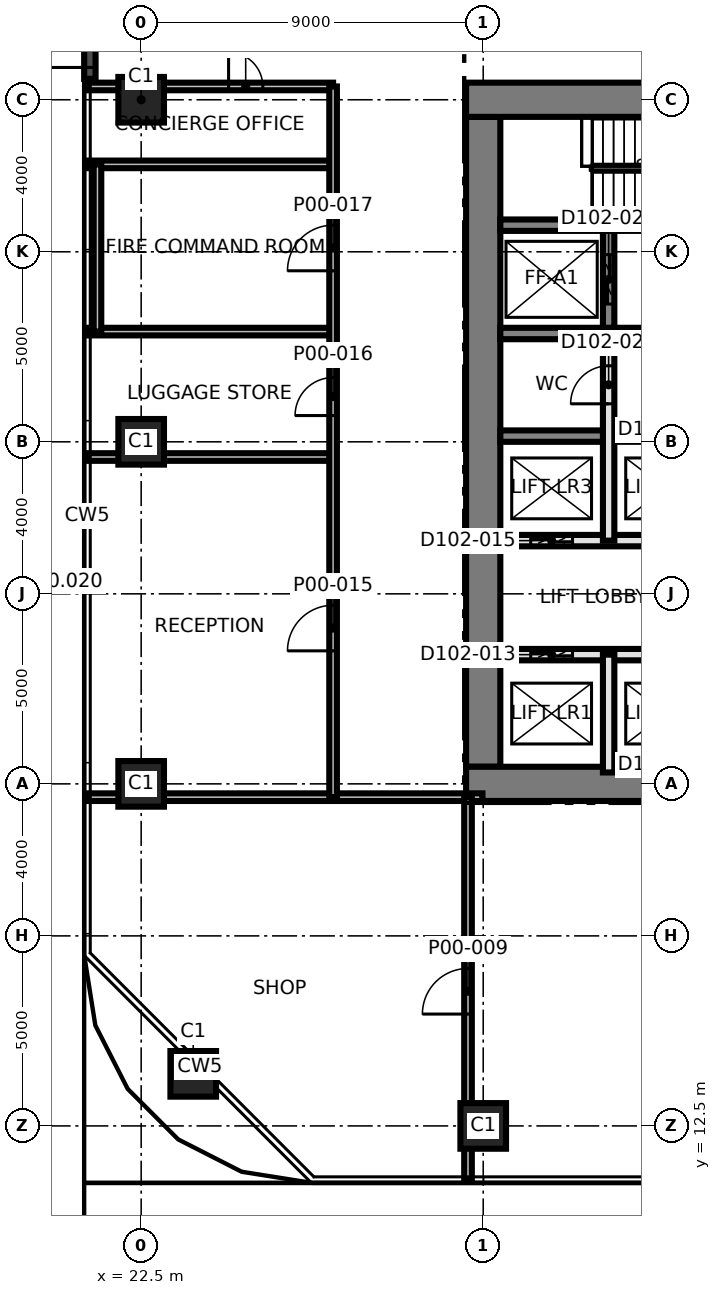
"""IFC4 building model, lengths in metres.
Left out: names, types, materials, properties, quantities, classifications, styles, units other than length and angle.
Written with IfcOpenShell. Run it as: python <this file> out.ifc"""

import sys

from ifc_helpers import new_model, si_unit, direction, frame, frame_2d, origin, origin_2d, place, context, subcontext, project, spatial, rectangle, extrude, element, fill, save


model = new_model("IFC4")
c1 = context("Model", 3, precision=1e-05, world=origin(), true_north=direction((0.0, 1.0)))
c2 = subcontext(c1, "Body", "Model", "MODEL_VIEW")
j1 = project(units=[si_unit("LENGTHUNIT", "METRE"), si_unit("PLANEANGLEUNIT", "RADIAN")], contexts=[c1])
p1 = place(None, origin())
s1 = spatial("IfcSite", under=j1, at=p1, CompositionType="ELEMENT")
p2 = place(p1, origin())
s2 = spatial("IfcBuilding", under=s1, at=p2, CompositionType="ELEMENT")
p3 = place(p2, origin())
s3 = spatial("IfcBuildingStorey", under=s2, at=p3, CompositionType="ELEMENT", Elevation=0.0)
p4 = place(p3, frame((31.5, 21.95, 0.0), z_axis=(0.0, 0.0, 1.0), x_axis=(0.0, 1.0, 0.0)))
e1 = element("IfcWall", 1, at=p4, inside=s3, PredefinedType="SHEAR", context=c2, shape_type="SweptSolid", body=[
    extrude(rectangle(XDim=17.1, YDim=0.9, at=frame_2d((8.55, 0.0))), origin(), (0.0, 0.0, 1.0), 8.0),
])
p5 = place(p3, frame((31.05, 21.5, 0.0), z_axis=(0.0, 0.0, 1.0), x_axis=(1.0, 0.0, 0.0)))
e2 = element("IfcWall", 2, at=p5, inside=s3, PredefinedType="SHEAR", context=c2, shape_type="SweptSolid", body=[
    extrude(rectangle(XDim=27.0, YDim=0.9, at=frame_2d((13.5, 0.0))), origin(), (0.0, 0.0, 1.0), 8.0),
])
p6 = place(p3, frame((31.05, 39.5, 0.0), z_axis=(0.0, 0.0, 1.0), x_axis=(1.0, 0.0, 0.0)))
e3 = element("IfcWall", 3, at=p6, inside=s3, PredefinedType="SHEAR", context=c2, shape_type="SweptSolid", body=[
    extrude(rectangle(XDim=27.0, YDim=0.9, at=frame_2d((13.5, 0.0))), origin(), (0.0, 0.0, 1.0), 8.0),
])
p7 = place(p6, frame((7.1, 0.0, 0.0)))
e4 = element("IfcOpeningElement", 4, at=p7, cuts=e3, PredefinedType="OPENING", context=c2, shape_type="SweptSolid", body=[
    extrude(rectangle(XDim=1.3, YDim=2.1, at=frame_2d((0.65, 1.05))), frame((0.0, 0.46, 0.0), z_axis=(0.0, -1.0, 0.0), x_axis=(1.0, 0.0, 0.0)), (0.0, 0.0, 1.0), 0.92),
])
p8 = place(p6, frame((18.475, 0.0, 0.0)))
e5 = element("IfcOpeningElement", 5, at=p8, cuts=e3, PredefinedType="OPENING", context=c2, shape_type="SweptSolid", body=[
    extrude(rectangle(XDim=0.95, YDim=2.1, at=frame_2d((0.475, 1.05))), frame((0.0, 0.46, 0.0), z_axis=(0.0, -1.0, 0.0), x_axis=(1.0, 0.0, 0.0)), (0.0, 0.0, 1.0), 0.92),
])
p9 = place(p3, frame((31.95, 30.65, 0.0), z_axis=(0.0, 0.0, 1.0), x_axis=(1.0, 0.0, 0.0)))
e6 = element("IfcWall", 6, at=p9, inside=s3, PredefinedType="SHEAR", context=c2, shape_type="SweptSolid", body=[
    extrude(rectangle(XDim=26.1, YDim=0.3, at=frame_2d((13.05, 0.0))), origin(), (0.0, 0.0, 1.0), 8.0),
])
p10 = place(p9, frame((24.55, 0.0, 0.0)))
e7 = element("IfcOpeningElement", 7, at=p10, cuts=e6, PredefinedType="OPENING", context=c2, shape_type="SweptSolid", body=[
    extrude(rectangle(XDim=1.0, YDim=2.1, at=frame_2d((0.5, 1.05))), frame((0.0, 0.16, 0.0), z_axis=(0.0, -1.0, 0.0), x_axis=(1.0, 0.0, 0.0)), (0.0, 0.0, 1.0), 0.32),
])
p11 = place(p9, frame((11.35, 0.0, 0.0)))
e8 = element("IfcOpeningElement", 8, at=p11, cuts=e6, PredefinedType="OPENING", context=c2, shape_type="SweptSolid", body=[
    extrude(rectangle(XDim=1.0, YDim=2.1, at=frame_2d((0.5, 1.05))), frame((0.0, 0.16, 0.0), z_axis=(0.0, -1.0, 0.0), x_axis=(1.0, 0.0, 0.0)), (0.0, 0.0, 1.0), 0.32),
])
p12 = place(p3, frame((31.95, 33.35, 0.0), z_axis=(0.0, 0.0, 1.0), x_axis=(1.0, 0.0, 0.0)))
e9 = element("IfcWall", 9, at=p12, inside=s3, PredefinedType="SHEAR", context=c2, shape_type="SweptSolid", body=[
    extrude(rectangle(XDim=26.1, YDim=0.3, at=frame_2d((13.05, 0.0))), origin(), (0.0, 0.0, 1.0), 8.0),
])
p13 = place(p12, frame((13.7, 0.0, 0.0)))
e10 = element("IfcOpeningElement", 10, at=p13, cuts=e9, PredefinedType="OPENING", context=c2, shape_type="SweptSolid", body=[
    extrude(rectangle(XDim=1.4, YDim=2.1, at=frame_2d((0.7, 1.05))), frame((0.0, 0.16, 0.0), z_axis=(0.0, -1.0, 0.0), x_axis=(1.0, 0.0, 0.0)), (0.0, 0.0, 1.0), 0.32),
])
p14 = place(p12, frame((5.175, 0.0, 0.0)))
e11 = element("IfcOpeningElement", 11, at=p14, cuts=e9, PredefinedType="OPENING", context=c2, shape_type="SweptSolid", body=[
    extrude(rectangle(XDim=1.2, YDim=2.1, at=frame_2d((0.6, 1.05))), frame((0.0, 0.16, 0.0), z_axis=(0.0, -1.0, 0.0), x_axis=(1.0, 0.0, 0.0)), (0.0, 0.0, 1.0), 0.32),
])
p15 = place(p12, frame((19.725, 0.0, 0.0)))
e12 = element("IfcOpeningElement", 12, at=p15, cuts=e9, PredefinedType="OPENING", context=c2, shape_type="SweptSolid", body=[
    extrude(rectangle(XDim=1.2, YDim=2.1, at=frame_2d((0.6, 1.05))), frame((0.0, 0.16, 0.0), z_axis=(0.0, -1.0, 0.0), x_axis=(1.0, 0.0, 0.0)), (0.0, 0.0, 1.0), 0.32),
])
p16 = place(p3, frame((31.95, 36.2, 0.0), z_axis=(0.0, 0.0, 1.0), x_axis=(1.0, 0.0, 0.0)))
e13 = element("IfcWall", 13, at=p16, inside=s3, PredefinedType="SHEAR", context=c2, shape_type="SweptSolid", body=[
    extrude(rectangle(XDim=8.55, YDim=0.3, at=frame_2d((4.275, 0.0))), origin(), (0.0, 0.0, 1.0), 8.0),
])
p17 = place(p16, frame((6.45, 0.0, 0.0)))
e14 = element("IfcOpeningElement", 14, at=p17, cuts=e13, PredefinedType="OPENING", context=c2, shape_type="SweptSolid", body=[
    extrude(rectangle(XDim=1.2, YDim=2.1, at=frame_2d((0.6, 1.05))), frame((0.0, 0.16, 0.0), z_axis=(0.0, -1.0, 0.0), x_axis=(1.0, 0.0, 0.0)), (0.0, 0.0, 1.0), 0.32),
])
p18 = place(p3, frame((34.8, 33.5, 0.0), z_axis=(0.0, 0.0, 1.0), x_axis=(0.0, 1.0, 0.0)))
e15 = element("IfcWall", 15, at=p18, inside=s3, PredefinedType="SHEAR", context=c2, shape_type="SweptSolid", body=[
    extrude(rectangle(XDim=2.55, YDim=0.3, at=frame_2d((1.275, 0.0))), origin(), (0.0, 0.0, 1.0), 8.0),
])
p19 = place(p18, frame((0.625, 0.0, 0.0)))
e16 = element("IfcOpeningElement", 16, at=p19, cuts=e15, PredefinedType="OPENING", context=c2, shape_type="SweptSolid", body=[
    extrude(rectangle(XDim=1.3, YDim=2.4, at=frame_2d((0.65, 1.2))), frame((0.0, 0.16, 0.0), z_axis=(0.0, -1.0, 0.0), x_axis=(1.0, 0.0, 0.0)), (0.0, 0.0, 1.0), 0.32),
])
for number, where, z_axis, x_axis in (
    (17, (31.5, 12.5, 0.0), (0.0, 0.0, 1.0), (1.0, 0.0, 0.0)),
    (18, (23.87, 13.87, 0.0), (0.0, 0.0, 1.0), (1.0, 0.0, 0.0)),
    (19, (22.5, 21.5, 0.0), (0.0, 0.0, 1.0), (1.0, 0.0, 0.0)),
    (20, (22.5, 30.5, 0.0), (0.0, 0.0, 1.0), (1.0, 0.0, 0.0)),
    (21, (22.5, 39.5, 0.0), (0.0, 0.0, 1.0), (1.0, 0.0, 0.0)),
):
    element("IfcColumn", number, at=place(p3, frame(where, z_axis=z_axis, x_axis=x_axis)), inside=s3, PredefinedType="COLUMN", context=c2, shape_type="SweptSolid", body=[
        extrude(rectangle(XDim=1.2, YDim=1.2, at=origin_2d()), origin(), (0.0, 0.0, 1.0), 8.0),
    ])
p20 = place(p3, frame((21.15, 40.05, 0.0), z_axis=(0.0, 0.0, 1.0), x_axis=(0.0, 1.0, 0.0)))
e22 = element("IfcWall", 22, at=p20, inside=s3, PredefinedType="SOLIDWALL", context=c2, shape_type="SweptSolid", body=[
    extrude(rectangle(XDim=2.6, YDim=0.3, at=frame_2d((1.3, 0.0))), origin(), (0.0, 0.0, 1.0), 7.7),
])
p21 = place(p20, frame((0.3, 0.0, 0.0)))
e23 = element("IfcOpeningElement", 23, at=p21, cuts=e22, PredefinedType="OPENING", context=c2, shape_type="SweptSolid", body=[
    extrude(rectangle(XDim=1.8, YDim=2.4, at=frame_2d((0.9, 1.2))), frame((0.0, 0.16, 0.0), z_axis=(0.0, -1.0, 0.0), x_axis=(1.0, 0.0, 0.0)), (0.0, 0.0, 1.0), 0.32),
])
p22 = place(p3, frame((31.8, 24.9, 0.0), z_axis=(0.0, 0.0, 1.0), x_axis=(1.0, 0.0, 0.0)))
e24 = element("IfcWall", 24, at=p22, inside=s3, PredefinedType="SOLIDWALL", context=c2, shape_type="SweptSolid", body=[
    extrude(rectangle(XDim=9.0, YDim=0.3, at=frame_2d((4.5, 0.0))), origin(), (0.0, 0.0, 1.0), 7.7),
])
p23 = place(p22, frame((7.05, 0.0, 0.0)))
e25 = element("IfcOpeningElement", 25, at=p23, cuts=e24, PredefinedType="OPENING", context=c2, shape_type="SweptSolid", body=[
    extrude(rectangle(XDim=0.9, YDim=2.1, at=frame_2d((0.45, 1.05))), frame((0.0, 0.16, 0.0), z_axis=(0.0, -1.0, 0.0), x_axis=(1.0, 0.0, 0.0)), (0.0, 0.0, 1.0), 0.32),
])
p24 = place(p22, frame((0.95, 0.0, 0.0)))
e26 = element("IfcOpeningElement", 26, at=p24, cuts=e24, PredefinedType="OPENING", context=c2, shape_type="SweptSolid", body=[
    extrude(rectangle(XDim=1.1, YDim=2.4, at=frame_2d((0.55, 1.2))), frame((0.0, 0.16, 0.0), z_axis=(0.0, -1.0, 0.0), x_axis=(1.0, 0.0, 0.0)), (0.0, 0.0, 1.0), 0.32),
])
p25 = place(p22, frame((3.95, 0.0, 0.0)))
e27 = element("IfcOpeningElement", 27, at=p25, cuts=e24, PredefinedType="OPENING", context=c2, shape_type="SweptSolid", body=[
    extrude(rectangle(XDim=1.1, YDim=2.4, at=frame_2d((0.55, 1.2))), frame((0.0, 0.16, 0.0), z_axis=(0.0, -1.0, 0.0), x_axis=(1.0, 0.0, 0.0)), (0.0, 0.0, 1.0), 0.32),
])
p26 = place(p3, frame((31.8, 27.9, 0.0), z_axis=(0.0, 0.0, 1.0), x_axis=(1.0, 0.0, 0.0)))
e28 = element("IfcWall", 28, at=p26, inside=s3, PredefinedType="SOLIDWALL", context=c2, shape_type="SweptSolid", body=[
    extrude(rectangle(XDim=6.0, YDim=0.3, at=frame_2d((3.0, 0.0))), origin(), (0.0, 0.0, 1.0), 7.7),
])
p27 = place(p26, frame((0.95, 0.0, 0.0)))
e29 = element("IfcOpeningElement", 29, at=p27, cuts=e28, PredefinedType="OPENING", context=c2, shape_type="SweptSolid", body=[
    extrude(rectangle(XDim=1.1, YDim=2.4, at=frame_2d((0.55, 1.2))), frame((0.0, 0.16, 0.0), z_axis=(0.0, -1.0, 0.0), x_axis=(1.0, 0.0, 0.0)), (0.0, 0.0, 1.0), 0.32),
])
p28 = place(p26, frame((3.95, 0.0, 0.0)))
e30 = element("IfcOpeningElement", 30, at=p28, cuts=e28, PredefinedType="OPENING", context=c2, shape_type="SweptSolid", body=[
    extrude(rectangle(XDim=1.1, YDim=2.4, at=frame_2d((0.55, 1.2))), frame((0.0, 0.16, 0.0), z_axis=(0.0, -1.0, 0.0), x_axis=(1.0, 0.0, 0.0)), (0.0, 0.0, 1.0), 0.32),
])
p29 = place(p3, frame((34.8, 21.8, 0.0), z_axis=(0.0, 0.0, 1.0), x_axis=(0.0, 1.0, 0.0)))
e31 = element("IfcWall", 31, at=p29, inside=s3, PredefinedType="SOLIDWALL", context=c2, shape_type="SweptSolid", body=[
    extrude(rectangle(XDim=3.1, YDim=0.3, at=frame_2d((1.55, 0.0))), origin(), (0.0, 0.0, 1.0), 7.7),
])
p30 = place(p3, frame((34.8, 27.9, 0.0), z_axis=(0.0, 0.0, 1.0), x_axis=(0.0, 1.0, 0.0)))
e32 = element("IfcWall", 32, at=p30, inside=s3, PredefinedType="SOLIDWALL", context=c2, shape_type="SweptSolid", body=[
    extrude(rectangle(XDim=5.45, YDim=0.3, at=frame_2d((2.725, 0.0))), origin(), (0.0, 0.0, 1.0), 7.7),
])
p31 = place(p30, frame((3.6, 0.0, 0.0)))
e33 = element("IfcOpeningElement", 33, at=p31, cuts=e32, PredefinedType="OPENING", context=c2, shape_type="SweptSolid", body=[
    extrude(rectangle(XDim=1.0, YDim=2.1, at=frame_2d((0.5, 1.05))), frame((0.0, 0.16, 0.0), z_axis=(0.0, -1.0, 0.0), x_axis=(1.0, 0.0, 0.0)), (0.0, 0.0, 1.0), 0.32),
])
p32 = place(p3, frame((21.07, 21.15, 0.0), z_axis=(0.0, 0.0, 1.0), x_axis=(1.0, 0.0, 0.0)))
e34 = element("IfcWall", 34, at=p32, inside=s3, PredefinedType="PARTITIONING", context=c2, shape_type="SweptSolid", body=[
    extrude(rectangle(XDim=10.41, YDim=0.2, at=frame_2d((5.205, 0.0))), origin(), (0.0, 0.0, 1.0), 6.8),
])
for number, where, z_axis, x_axis in (
    (35, (21.07, 30.1, 0.0), (0.0, 0.0, 1.0), (1.0, 0.0, 0.0)),
    (36, (21.07, 33.4, 0.0), (0.0, 0.0, 1.0), (1.0, 0.0, 0.0)),
    (37, (21.07, 37.8, 0.0), (0.0, 0.0, 1.0), (1.0, 0.0, 0.0)),
):
    element("IfcWall", number, at=place(p3, frame(where, z_axis=z_axis, x_axis=x_axis)), inside=s3, PredefinedType="PARTITIONING", context=c2, shape_type="SweptSolid", body=[
        extrude(rectangle(XDim=6.48, YDim=0.2, at=frame_2d((3.24, 0.0))), origin(), (0.0, 0.0, 1.0), 6.8),
    ])
p33 = place(p3, frame((21.07, 39.85, 0.0), z_axis=(0.0, 0.0, 1.0), x_axis=(1.0, 0.0, 0.0)))
e38 = element("IfcWall", 38, at=p33, inside=s3, PredefinedType="PARTITIONING", context=c2, shape_type="SweptSolid", body=[
    extrude(rectangle(XDim=6.48, YDim=0.2, at=frame_2d((3.24, 0.0))), origin(), (0.0, 0.0, 1.0), 6.8),
])
p34 = place(p33, frame((3.73, 0.0, 0.0)))
e39 = element("IfcOpeningElement", 39, at=p34, cuts=e38, PredefinedType="OPENING", context=c2, shape_type="SweptSolid", body=[
    extrude(rectangle(XDim=0.9, YDim=2.1, at=frame_2d((0.45, 1.05))), frame((0.0, 0.11, 0.0), z_axis=(0.0, -1.0, 0.0), x_axis=(1.0, 0.0, 0.0)), (0.0, 0.0, 1.0), 0.22),
])
p35 = place(p3, frame((21.35, 33.4, 0.0), z_axis=(0.0, 0.0, 1.0), x_axis=(0.0, 1.0, 0.0)))
e40 = element("IfcWall", 40, at=p35, inside=s3, PredefinedType="PARTITIONING", context=c2, shape_type="SweptSolid", body=[
    extrude(rectangle(XDim=4.4, YDim=0.2, at=frame_2d((2.2, 0.0))), origin(), (0.0, 0.0, 1.0), 7.7),
])
p36 = place(p3, frame((27.55, 21.15, 0.0), z_axis=(0.0, 0.0, 1.0), x_axis=(0.0, 1.0, 0.0)))
e41 = element("IfcWall", 41, at=p36, inside=s3, PredefinedType="PARTITIONING", context=c2, shape_type="SweptSolid", body=[
    extrude(rectangle(XDim=18.7, YDim=0.2, at=frame_2d((9.35, 0.0))), origin(), (0.0, 0.0, 1.0), 7.7),
])
p37 = place(p36, frame((3.85, 0.0, 0.0)))
e42 = element("IfcOpeningElement", 42, at=p37, cuts=e41, PredefinedType="OPENING", context=c2, shape_type="SweptSolid", body=[
    extrude(rectangle(XDim=1.2, YDim=2.1, at=frame_2d((0.6, 1.05))), frame((0.0, 0.11, 0.0), z_axis=(0.0, -1.0, 0.0), x_axis=(1.0, 0.0, 0.0)), (0.0, 0.0, 1.0), 0.22),
])
p38 = place(p36, frame((10.041, 0.0, 0.0)))
e43 = element("IfcOpeningElement", 43, at=p38, cuts=e41, PredefinedType="OPENING", context=c2, shape_type="SweptSolid", body=[
    extrude(rectangle(XDim=1.0, YDim=2.1, at=frame_2d((0.5, 1.05))), frame((0.0, 0.11, 0.0), z_axis=(0.0, -1.0, 0.0), x_axis=(1.0, 0.0, 0.0)), (0.0, 0.0, 1.0), 0.22),
])
p39 = place(p36, frame((13.85, 0.0, 0.0)))
e44 = element("IfcOpeningElement", 44, at=p39, cuts=e41, PredefinedType="OPENING", context=c2, shape_type="SweptSolid", body=[
    extrude(rectangle(XDim=1.2, YDim=2.1, at=frame_2d((0.6, 1.05))), frame((0.0, 0.11, 0.0), z_axis=(0.0, -1.0, 0.0), x_axis=(1.0, 0.0, 0.0)), (0.0, 0.0, 1.0), 0.22),
])
p40 = place(p3, frame((31.1, 11.07, 0.0), z_axis=(0.0, 0.0, 1.0), x_axis=(0.0, 1.0, 0.0)))
e45 = element("IfcWall", 45, at=p40, inside=s3, PredefinedType="PARTITIONING", context=c2, shape_type="SweptSolid", body=[
    extrude(rectangle(XDim=10.08, YDim=0.2, at=frame_2d((5.04, 0.0))), origin(), (0.0, 0.0, 1.0), 6.8),
])
p41 = place(p40, frame((4.373, 0.0, 0.0)))
e46 = element("IfcOpeningElement", 46, at=p41, cuts=e45, PredefinedType="OPENING", context=c2, shape_type="SweptSolid", body=[
    extrude(rectangle(XDim=1.2, YDim=2.1, at=frame_2d((0.6, 1.05))), frame((0.0, 0.11, 0.0), z_axis=(0.0, -1.0, 0.0), x_axis=(1.0, 0.0, 0.0)), (0.0, 0.0, 1.0), 0.22),
])
p42 = place(p21, origin())
e47 = element("IfcDoor", 47, at=p42, inside=s3, OperationType="SINGLE_SWING_LEFT", PredefinedType="DOOR", context=c2, shape_type="SweptSolid", body=[
    extrude(rectangle(XDim=1.8, YDim=2.4, at=frame_2d((0.9, 1.2))), frame((0.0, 0.025, 0.0), z_axis=(0.0, -1.0, 0.0), x_axis=(1.0, 0.0, 0.0)), (0.0, 0.0, 1.0), 0.05),
])
fill(e23, e47)
p43 = place(p24, origin())
e48 = element("IfcDoor", 48, at=p43, inside=s3, OperationType="SLIDING_TO_LEFT", PredefinedType="DOOR", context=c2, shape_type="SweptSolid", body=[
    extrude(rectangle(XDim=1.1, YDim=2.4, at=frame_2d((0.55, 1.2))), frame((0.0, 0.025, 0.0), z_axis=(0.0, -1.0, 0.0), x_axis=(1.0, 0.0, 0.0)), (0.0, 0.0, 1.0), 0.05),
])
fill(e26, e48)
p44 = place(p27, origin())
e49 = element("IfcDoor", 49, at=p44, inside=s3, OperationType="SLIDING_TO_LEFT", PredefinedType="DOOR", context=c2, shape_type="SweptSolid", body=[
    extrude(rectangle(XDim=1.1, YDim=2.4, at=frame_2d((0.55, 1.2))), frame((0.0, 0.025, 0.0), z_axis=(0.0, -1.0, 0.0), x_axis=(1.0, 0.0, 0.0)), (0.0, 0.0, 1.0), 0.05),
])
fill(e29, e49)
p45 = place(p19, origin())
e50 = element("IfcDoor", 50, at=p45, inside=s3, OperationType="SLIDING_TO_LEFT", PredefinedType="DOOR", context=c2, shape_type="SweptSolid", body=[
    extrude(rectangle(XDim=1.3, YDim=2.4, at=frame_2d((0.65, 1.2))), frame((0.0, 0.025, 0.0), z_axis=(0.0, -1.0, 0.0), x_axis=(1.0, 0.0, 0.0)), (0.0, 0.0, 1.0), 0.05),
])
fill(e16, e50)
p46 = place(p31, origin())
e51 = element("IfcDoor", 51, at=p46, inside=s3, OperationType="SINGLE_SWING_LEFT", PredefinedType="DOOR", context=c2, shape_type="SweptSolid", body=[
    extrude(rectangle(XDim=1.0, YDim=2.1, at=frame_2d((0.5, 1.05))), frame((0.0, 0.025, 0.0), z_axis=(0.0, -1.0, 0.0), x_axis=(1.0, 0.0, 0.0)), (0.0, 0.0, 1.0), 0.05),
])
fill(e33, e51)
p47 = place(p41, origin())
e52 = element("IfcDoor", 52, at=p47, inside=s3, OperationType="SINGLE_SWING_LEFT", PredefinedType="DOOR", context=c2, shape_type="SweptSolid", body=[
    extrude(rectangle(XDim=1.2, YDim=2.1, at=frame_2d((0.6, 1.05))), frame((0.0, 0.025, 0.0), z_axis=(0.0, -1.0, 0.0), x_axis=(1.0, 0.0, 0.0)), (0.0, 0.0, 1.0), 0.05),
])
fill(e46, e52)
p48 = place(p37, origin())
e53 = element("IfcDoor", 53, at=p48, inside=s3, OperationType="SINGLE_SWING_LEFT", PredefinedType="DOOR", context=c2, shape_type="SweptSolid", body=[
    extrude(rectangle(XDim=1.2, YDim=2.1, at=frame_2d((0.6, 1.05))), frame((0.0, 0.025, 0.0), z_axis=(0.0, -1.0, 0.0), x_axis=(1.0, 0.0, 0.0)), (0.0, 0.0, 1.0), 0.05),
])
fill(e42, e53)
p49 = place(p38, origin())
e54 = element("IfcDoor", 54, at=p49, inside=s3, OperationType="SINGLE_SWING_RIGHT", PredefinedType="DOOR", context=c2, shape_type="SweptSolid", body=[
    extrude(rectangle(XDim=1.0, YDim=2.1, at=frame_2d((0.5, 1.05))), frame((0.0, 0.025, 0.0), z_axis=(0.0, -1.0, 0.0), x_axis=(1.0, 0.0, 0.0)), (0.0, 0.0, 1.0), 0.05),
])
fill(e43, e54)
p50 = place(p39, origin())
e55 = element("IfcDoor", 55, at=p50, inside=s3, OperationType="SINGLE_SWING_LEFT", PredefinedType="DOOR", context=c2, shape_type="SweptSolid", body=[
    extrude(rectangle(XDim=1.2, YDim=2.1, at=frame_2d((0.6, 1.05))), frame((0.0, 0.025, 0.0), z_axis=(0.0, -1.0, 0.0), x_axis=(1.0, 0.0, 0.0)), (0.0, 0.0, 1.0), 0.05),
])
fill(e44, e55)
p51 = place(p34, origin())
e56 = element("IfcDoor", 56, at=p51, inside=s3, OperationType="SINGLE_SWING_RIGHT", PredefinedType="DOOR", context=c2, shape_type="SweptSolid", body=[
    extrude(rectangle(XDim=0.9, YDim=2.1, at=frame_2d((0.45, 1.05))), frame((0.0, 0.025, 0.0), z_axis=(0.0, -1.0, 0.0), x_axis=(1.0, 0.0, 0.0)), (0.0, 0.0, 1.0), 0.05),
])
fill(e39, e56)
save(model, sys.argv[1])
